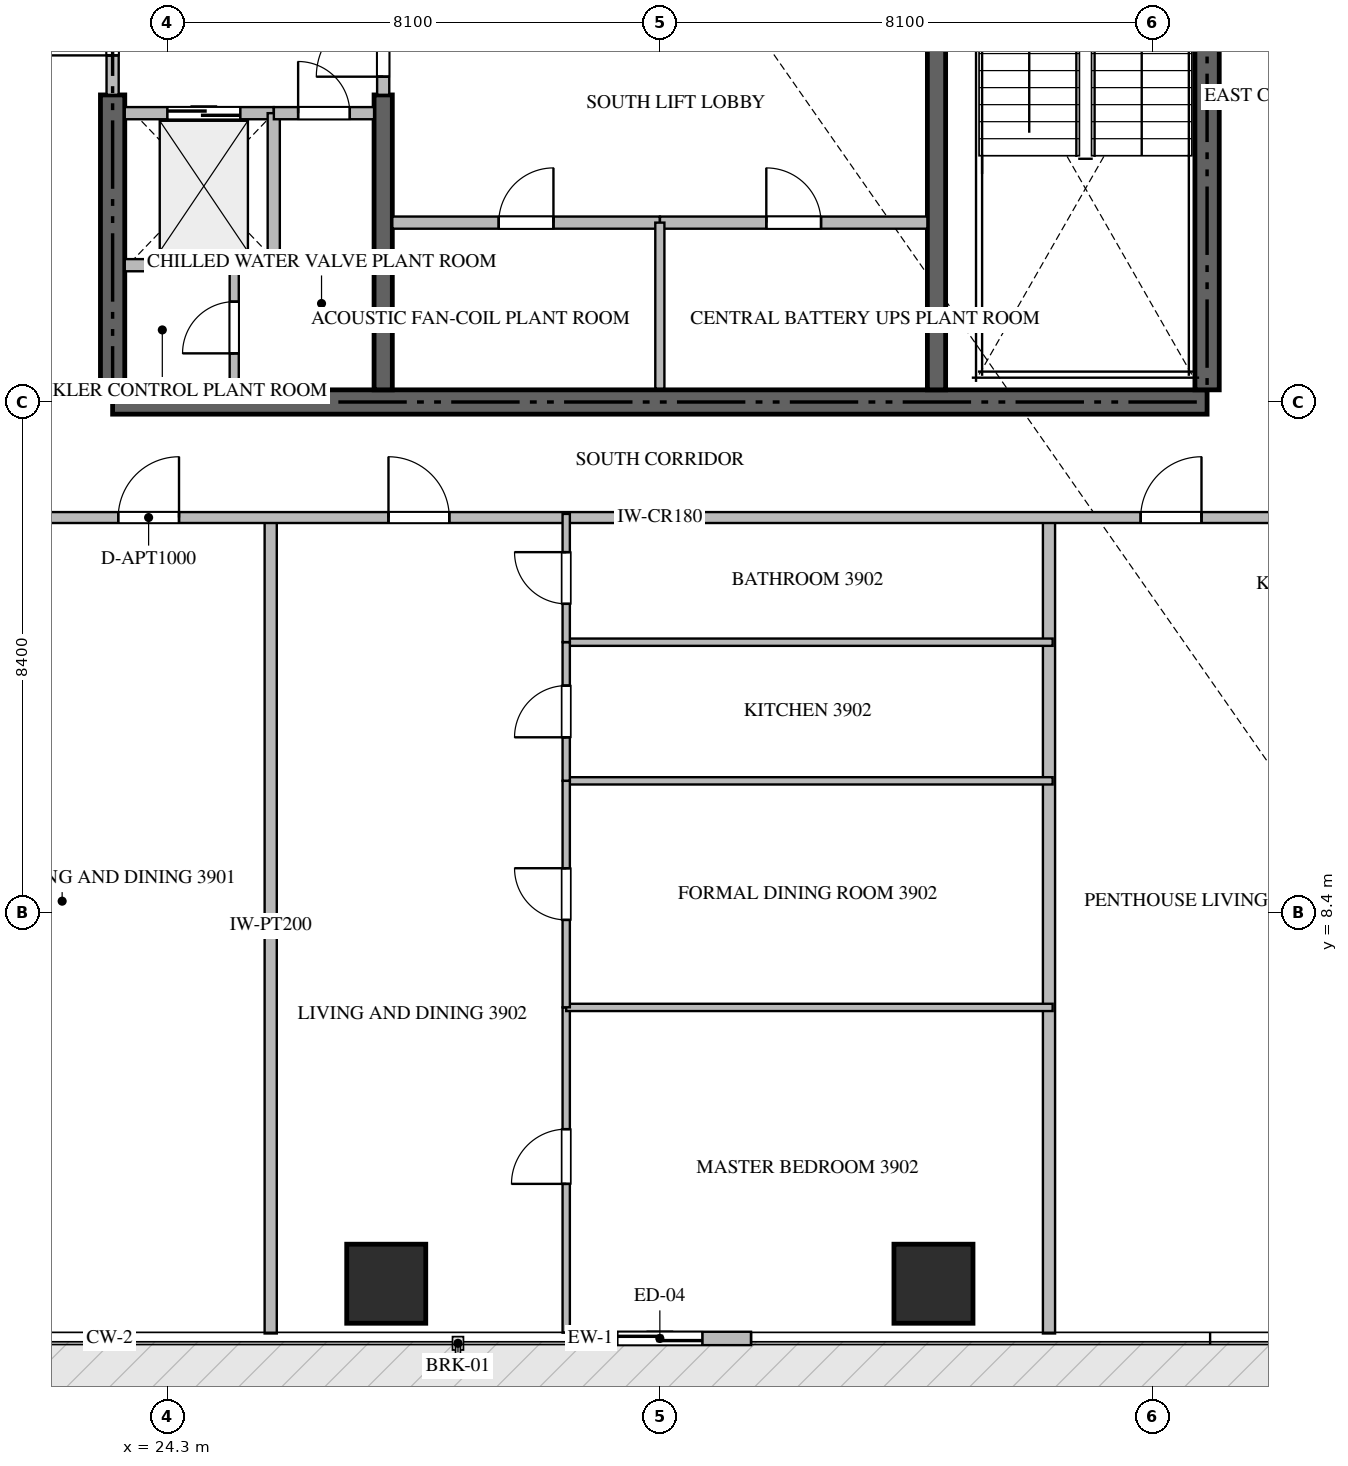
"""IFC4 building model, lengths in metres.
Left out: names, types, materials, properties, quantities, classifications, styles, units other than length and angle.
Written with IfcOpenShell. Run it as: python <this file> out.ifc"""

import sys

from ifc_helpers import new_model, si_unit, direction, frame, frame_2d, origin, origin_2d, place, context, subcontext, project, spatial, rectangle, extrude, source, transform, mapped, element, fill, save


model = new_model("IFC4")
c1 = context("Model", 3, precision=1e-05, world=origin(), true_north=direction((0.0, 1.0)))
c2 = subcontext(c1, "Body", "Model", "MODEL_VIEW")
j1 = project(units=[si_unit("LENGTHUNIT", "METRE"), si_unit("PLANEANGLEUNIT", "RADIAN")], contexts=[c1])
p1 = place(None, origin())
s1 = spatial("IfcSite", under=j1, at=p1, CompositionType="ELEMENT")
p2 = place(p1, origin())
s2 = spatial("IfcBuilding", under=s1, at=p2, CompositionType="ELEMENT")
p3 = place(p2, frame((0.0, 0.0, 157.65)))
s3 = spatial("IfcBuildingStorey", under=s2, at=p3, CompositionType="ELEMENT", Elevation=157.65)
p4 = place(p3, frame((23.4, 16.8, -0.26), z_axis=(0.0, 0.0, 1.0), x_axis=(1.0, 0.0, 0.0)))
e1 = element("IfcWall", 1, at=p4, inside=s3, PredefinedType="SHEAR", context=c2, shape_type="SweptSolid", body=[
    extrude(rectangle(XDim=18.0, YDim=0.4, at=frame_2d((9.0, 0.0))), origin(), (0.0, 0.0, 1.0), 3.748),
])
p5 = place(p3, frame((23.4, 17.0, -0.26), z_axis=(0.0, 0.0, 1.0), x_axis=(0.0, 1.0, 0.0)))
e2 = element("IfcWall", 2, at=p5, inside=s3, PredefinedType="SHEAR", context=c2, shape_type="SweptSolid", body=[
    extrude(rectangle(XDim=4.85, YDim=0.4, at=frame_2d((2.425, 0.0))), origin(), (0.0, 0.0, 1.0), 3.748),
])
p6 = place(p3, frame((41.4, 17.0, -0.26), z_axis=(0.0, 0.0, 1.0), x_axis=(0.0, 1.0, 0.0)))
e3 = element("IfcWall", 3, at=p6, inside=s3, PredefinedType="SHEAR", context=c2, shape_type="SweptSolid", body=[
    extrude(rectangle(XDim=8.35, YDim=0.4, at=frame_2d((4.175, 0.0))), origin(), (0.0, 0.0, 1.0), 3.748),
])
p7 = place(p3, frame((27.85, 17.0, -0.26), z_axis=(0.0, 0.0, 1.0), x_axis=(0.0, 1.0, 0.0)))
e4 = element("IfcWall", 4, at=p7, inside=s3, PredefinedType="SHEAR", context=c2, shape_type="SweptSolid", body=[
    extrude(rectangle(XDim=4.85, YDim=0.3, at=frame_2d((2.425, 0.0))), origin(), (0.0, 0.0, 1.0), 3.748),
])
p8 = place(p3, frame((36.95, 17.0, -0.26), z_axis=(0.0, 0.0, 1.0), x_axis=(0.0, 1.0, 0.0)))
e5 = element("IfcWall", 5, at=p8, inside=s3, PredefinedType="SHEAR", context=c2, shape_type="SweptSolid", body=[
    extrude(rectangle(XDim=8.35, YDim=0.3, at=frame_2d((4.175, 0.0))), origin(), (0.0, 0.0, 1.0), 3.748),
])
m1 = source(origin(), c2, "Body", "SweptSolid", [
    extrude(rectangle(XDim=1.3, YDim=1.3, at=origin_2d()), origin(), (0.0, 0.0, 1.0), 3.75),
])
for number, where, z_axis, x_axis in (
    (6, (27.9, 2.3, -0.26), (0.0, 0.0, 1.0), (1.0, 0.0, 0.0)),
    (7, (36.9, 2.3, -0.26), (0.0, 0.0, 1.0), (1.0, 0.0, 0.0)),
):
    element("IfcColumn", number, at=place(p3, frame(where, z_axis=z_axis, x_axis=x_axis)), inside=s3, PredefinedType="COLUMN", context=c2, shape_type="MappedRepresentation", body=[
        mapped(m1, transform((0.0, 0.0, 0.0), scale=1.0)),
    ])
p9 = place(p3, frame((30.9, 1.4, 0.0), z_axis=(0.0, 0.0, 1.0), x_axis=(1.0, 0.0, 0.0)))
e8 = element("IfcWall", 8, at=p9, inside=s3, PredefinedType="ELEMENTEDWALL", context=c2, shape_type="SweptSolid", body=[
    extrude(rectangle(XDim=3.0, YDim=0.22, at=frame_2d((1.5, 0.0))), origin(), (0.0, 0.0, 1.0), 3.475),
])
p10 = place(p9, frame((0.8, 0.0, 0.0)))
e9 = element("IfcOpeningElement", 9, at=p10, cuts=e8, PredefinedType="OPENING", context=c2, shape_type="SweptSolid", body=[
    extrude(rectangle(XDim=1.4, YDim=2.25, at=frame_2d((0.7, 1.125))), frame((0.0, 0.12, 0.0), z_axis=(0.0, -1.0, 0.0), x_axis=(1.0, 0.0, 0.0)), (0.0, 0.0, 1.0), 0.24),
])
p11 = place(p3, frame((23.6, 21.55, 0.0), z_axis=(0.0, 0.0, 1.0), x_axis=(1.0, 0.0, 0.0)))
e10 = element("IfcWall", 10, at=p11, inside=s3, PredefinedType="STANDARD", context=c2, shape_type="SweptSolid", body=[
    extrude(rectangle(XDim=2.45, YDim=0.2, at=frame_2d((1.225, 0.0))), origin(), (0.0, 0.0, 1.0), 3.49),
])
p12 = place(p11, frame((0.7, 0.0, 0.0)))
e11 = element("IfcOpeningElement", 11, at=p12, cuts=e10, PredefinedType="OPENING", context=c2, shape_type="SweptSolid", body=[
    extrude(rectangle(XDim=1.2, YDim=2.2, at=frame_2d((0.6, 1.1))), frame((0.0, 0.11, 0.0), z_axis=(0.0, -1.0, 0.0), x_axis=(1.0, 0.0, 0.0)), (0.0, 0.0, 1.0), 0.22),
])
p13 = place(p3, frame((26.05, 19.05, 0.0), z_axis=(0.0, 0.0, 1.0), x_axis=(0.0, 1.0, 0.0)))
e12 = element("IfcWall", 12, at=p13, inside=s3, PredefinedType="STANDARD", context=c2, shape_type="SweptSolid", body=[
    extrude(rectangle(XDim=2.5, YDim=0.2, at=frame_2d((1.25, 0.0))), origin(), (0.0, 0.0, 1.0), 3.49),
])
p14 = place(p3, frame((23.6, 19.05, 0.0), z_axis=(0.0, 0.0, 1.0), x_axis=(1.0, 0.0, 0.0)))
e13 = element("IfcWall", 13, at=p14, inside=s3, PredefinedType="STANDARD", context=c2, shape_type="SweptSolid", body=[
    extrude(rectangle(XDim=2.45, YDim=0.2, at=frame_2d((1.225, 0.0))), origin(), (0.0, 0.0, 1.0), 3.49),
])
p15 = place(p3, frame((26.052, 21.55, 0.0), z_axis=(0.0, 0.0, 1.0), x_axis=(1.0, 0.0, 0.0)))
e14 = element("IfcWall", 14, at=p15, inside=s3, PredefinedType="STANDARD", context=c2, shape_type="SweptSolid", body=[
    extrude(rectangle(XDim=1.648, YDim=0.2, at=frame_2d((0.824, 0.0))), origin(), (0.0, 0.0, 1.0), 3.49),
])
p16 = place(p15, frame((0.399, 0.0, 0.0)))
e15 = element("IfcOpeningElement", 15, at=p16, cuts=e14, PredefinedType="OPENING", context=c2, shape_type="SweptSolid", body=[
    extrude(rectangle(XDim=0.85, YDim=2.1, at=frame_2d((0.425, 1.05))), frame((0.0, 0.11, 0.0), z_axis=(0.0, -1.0, 0.0), x_axis=(1.0, 0.0, 0.0)), (0.0, 0.0, 1.0), 0.22),
])
p17 = place(p3, frame((23.4, 21.852, 0.0), z_axis=(0.0, 0.0, 1.0), x_axis=(0.0, 1.0, 0.0)))
e16 = element("IfcWall", 16, at=p17, inside=s3, PredefinedType="STANDARD", context=c2, shape_type="SweptSolid", body=[
    extrude(rectangle(XDim=2.396, YDim=0.2, at=frame_2d((1.198, 0.0))), origin(), (0.0, 0.0, 1.0), 3.49),
])
p18 = place(p17, frame((0.648, 0.0, 0.0)))
e17 = element("IfcOpeningElement", 17, at=p18, cuts=e16, PredefinedType="OPENING", context=c2, shape_type="SweptSolid", body=[
    extrude(rectangle(XDim=1.1, YDim=2.15, at=frame_2d((0.55, 1.075))), frame((0.0, 0.11, 0.0), z_axis=(0.0, -1.0, 0.0), x_axis=(1.0, 0.0, 0.0)), (0.0, 0.0, 1.0), 0.22),
])
p19 = place(p3, frame((27.85, 21.852, 0.0), z_axis=(0.0, 0.0, 1.0), x_axis=(0.0, 1.0, 0.0)))
e18 = element("IfcWall", 18, at=p19, inside=s3, PredefinedType="STANDARD", context=c2, shape_type="SweptSolid", body=[
    extrude(rectangle(XDim=1.696, YDim=0.2, at=frame_2d((0.848, 0.0))), origin(), (0.0, 0.0, 1.0), 3.49),
])
p20 = place(p19, frame((0.298, 0.0, 0.0)))
e19 = element("IfcOpeningElement", 19, at=p20, cuts=e18, PredefinedType="OPENING", context=c2, shape_type="SweptSolid", body=[
    extrude(rectangle(XDim=1.1, YDim=2.15, at=frame_2d((0.55, 1.075))), frame((0.0, 0.11, 0.0), z_axis=(0.0, -1.0, 0.0), x_axis=(1.0, 0.0, 0.0)), (0.0, 0.0, 1.0), 0.22),
])
p21 = place(p3, frame((25.4, 17.0, 0.0), z_axis=(0.0, 0.0, 1.0), x_axis=(0.0, 1.0, 0.0)))
e20 = element("IfcWall", 20, at=p21, inside=s3, PredefinedType="PARTITIONING", context=c2, shape_type="SweptSolid", body=[
    extrude(rectangle(XDim=2.05, YDim=0.15, at=frame_2d((1.025, 0.0))), origin(), (0.0, 0.0, 1.0), 3.49),
])
p22 = place(p21, frame((0.6, 0.0, 0.0)))
e21 = element("IfcOpeningElement", 21, at=p22, cuts=e20, PredefinedType="OPENING", context=c2, shape_type="SweptSolid", body=[
    extrude(rectangle(XDim=0.85, YDim=2.1, at=frame_2d((0.425, 1.05))), frame((0.0, 0.085, 0.0), z_axis=(0.0, -1.0, 0.0), x_axis=(1.0, 0.0, 0.0)), (0.0, 0.0, 1.0), 0.17),
])
p23 = place(p3, frame((28.0, 19.75, 0.0), z_axis=(0.0, 0.0, 1.0), x_axis=(1.0, 0.0, 0.0)))
e22 = element("IfcWall", 22, at=p23, inside=s3, PredefinedType="STANDARD", context=c2, shape_type="SweptSolid", body=[
    extrude(rectangle(XDim=4.4, YDim=0.2, at=frame_2d((2.2, 0.0))), origin(), (0.0, 0.0, 1.0), 3.49),
])
p24 = place(p23, frame((1.75, 0.0, 0.0)))
e23 = element("IfcOpeningElement", 23, at=p24, cuts=e22, PredefinedType="OPENING", context=c2, shape_type="SweptSolid", body=[
    extrude(rectangle(XDim=0.9, YDim=2.1, at=frame_2d((0.45, 1.05))), frame((0.0, 0.11, 0.0), z_axis=(0.0, -1.0, 0.0), x_axis=(1.0, 0.0, 0.0)), (0.0, 0.0, 1.0), 0.22),
])
p25 = place(p3, frame((32.402, 19.75, 0.0), z_axis=(0.0, 0.0, 1.0), x_axis=(1.0, 0.0, 0.0)))
e24 = element("IfcWall", 24, at=p25, inside=s3, PredefinedType="STANDARD", context=c2, shape_type="SweptSolid", body=[
    extrude(rectangle(XDim=4.398, YDim=0.2, at=frame_2d((2.199, 0.0))), origin(), (0.0, 0.0, 1.0), 3.49),
])
p26 = place(p25, frame((1.749, 0.0, 0.0)))
e25 = element("IfcOpeningElement", 25, at=p26, cuts=e24, PredefinedType="OPENING", context=c2, shape_type="SweptSolid", body=[
    extrude(rectangle(XDim=0.9, YDim=2.1, at=frame_2d((0.45, 1.05))), frame((0.0, 0.11, 0.0), z_axis=(0.0, -1.0, 0.0), x_axis=(1.0, 0.0, 0.0)), (0.0, 0.0, 1.0), 0.22),
])
p27 = place(p3, frame((32.4, 17.02, 0.0), z_axis=(0.0, 0.0, 1.0), x_axis=(0.0, 1.0, 0.0)))
e26 = element("IfcWall", 26, at=p27, inside=s3, PredefinedType="PARTITIONING", context=c2, shape_type="SweptSolid", body=[
    extrude(rectangle(XDim=2.73, YDim=0.15, at=frame_2d((1.365, 0.0))), origin(), (0.0, 0.0, 1.0), 3.49),
])
for number, where, z_axis, x_axis in (
    (27, (26.0, 1.482, 0.0), (0.0, 0.0, 1.0), (0.0, 1.0, 0.0)),
    (28, (38.8, 1.482, 0.0), (0.0, 0.0, 1.0), (0.0, 1.0, 0.0)),
):
    element("IfcWall", number, at=place(p3, frame(where, z_axis=z_axis, x_axis=x_axis)), inside=s3, PredefinedType="PARTITIONING", context=c2, shape_type="SweptSolid", body=[
        extrude(rectangle(XDim=13.418, YDim=0.2, at=frame_2d((6.709, 0.0))), origin(), (0.0, 0.0, 1.0), 3.49),
    ])
p28 = place(p3, frame((20.952, 14.9, 0.0), z_axis=(0.0, 0.0, 1.0), x_axis=(1.0, 0.0, 0.0)))
e29 = element("IfcWall", 29, at=p28, inside=s3, PredefinedType="PARTITIONING", context=c2, shape_type="SweptSolid", body=[
    extrude(rectangle(XDim=22.896, YDim=0.18, at=frame_2d((11.448, 0.0))), origin(), (0.0, 0.0, 1.0), 3.49),
])
p29 = place(p28, frame((2.54, 0.0, 0.0)))
e30 = element("IfcOpeningElement", 30, at=p29, cuts=e29, PredefinedType="OPENING", context=c2, shape_type="SweptSolid", body=[
    extrude(rectangle(XDim=1.0, YDim=2.15, at=frame_2d((0.5, 1.075))), frame((0.0, 0.1, 0.0), z_axis=(0.0, -1.0, 0.0), x_axis=(1.0, 0.0, 0.0)), (0.0, 0.0, 1.0), 0.2),
])
p30 = place(p28, frame((6.985, 0.0, 0.0)))
e31 = element("IfcOpeningElement", 31, at=p30, cuts=e29, PredefinedType="OPENING", context=c2, shape_type="SweptSolid", body=[
    extrude(rectangle(XDim=1.0, YDim=2.15, at=frame_2d((0.5, 1.075))), frame((0.0, 0.1, 0.0), z_axis=(0.0, -1.0, 0.0), x_axis=(1.0, 0.0, 0.0)), (0.0, 0.0, 1.0), 0.2),
])
p31 = place(p28, frame((19.356, 0.0, 0.0)))
e32 = element("IfcOpeningElement", 32, at=p31, cuts=e29, PredefinedType="OPENING", context=c2, shape_type="SweptSolid", body=[
    extrude(rectangle(XDim=1.0, YDim=2.15, at=frame_2d((0.5, 1.075))), frame((0.0, 0.1, 0.0), z_axis=(0.0, -1.0, 0.0), x_axis=(1.0, 0.0, 0.0)), (0.0, 0.0, 1.0), 0.2),
])
p32 = place(p3, frame((30.86, 1.495, 0.0), z_axis=(0.0, 0.0, 1.0), x_axis=(0.0, 1.0, 0.0)))
e33 = element("IfcWall", 33, at=p32, inside=s3, PredefinedType="PARTITIONING", context=c2, shape_type="SweptSolid", body=[
    extrude(rectangle(XDim=5.349, YDim=0.12, at=frame_2d((2.674, 0.0))), origin(), (0.0, 0.0, 1.0), 3.49),
])
p33 = place(p32, frame((2.447, 0.0, 0.0)))
e34 = element("IfcOpeningElement", 34, at=p33, cuts=e33, PredefinedType="OPENING", context=c2, shape_type="SweptSolid", body=[
    extrude(rectangle(XDim=0.9, YDim=2.1, at=frame_2d((0.45, 1.05))), frame((0.0, 0.07, 0.0), z_axis=(0.0, -1.0, 0.0), x_axis=(1.0, 0.0, 0.0)), (0.0, 0.0, 1.0), 0.14),
])
for number, where, z_axis, x_axis in (
    (35, (30.86, 6.844, 0.0), (0.0, 0.0, 1.0), (1.0, 0.0, 0.0)),
    (36, (30.86, 10.57, 0.0), (0.0, 0.0, 1.0), (1.0, 0.0, 0.0)),
    (37, (30.86, 12.85, 0.0), (0.0, 0.0, 1.0), (1.0, 0.0, 0.0)),
):
    element("IfcWall", number, at=place(p3, frame(where, z_axis=z_axis, x_axis=x_axis)), inside=s3, PredefinedType="PARTITIONING", context=c2, shape_type="SweptSolid", body=[
        extrude(rectangle(XDim=8.0, YDim=0.12, at=frame_2d((4.0, 0.0))), origin(), (0.0, 0.0, 1.0), 3.49),
    ])
p34 = place(p3, frame((30.86, 6.846, 0.0), z_axis=(0.0, 0.0, 1.0), x_axis=(0.0, 1.0, 0.0)))
e38 = element("IfcWall", 38, at=p34, inside=s3, PredefinedType="PARTITIONING", context=c2, shape_type="SweptSolid", body=[
    extrude(rectangle(XDim=3.724, YDim=0.12, at=frame_2d((1.862, 0.0))), origin(), (0.0, 0.0, 1.0), 3.49),
])
p35 = place(p34, frame((1.437, 0.0, 0.0)))
e39 = element("IfcOpeningElement", 39, at=p35, cuts=e38, PredefinedType="OPENING", context=c2, shape_type="SweptSolid", body=[
    extrude(rectangle(XDim=0.85, YDim=2.1, at=frame_2d((0.425, 1.05))), frame((0.0, 0.07, 0.0), z_axis=(0.0, -1.0, 0.0), x_axis=(1.0, 0.0, 0.0)), (0.0, 0.0, 1.0), 0.14),
])
p36 = place(p3, frame((30.86, 10.572, 0.0), z_axis=(0.0, 0.0, 1.0), x_axis=(0.0, 1.0, 0.0)))
e40 = element("IfcWall", 40, at=p36, inside=s3, PredefinedType="PARTITIONING", context=c2, shape_type="SweptSolid", body=[
    extrude(rectangle(XDim=2.278, YDim=0.12, at=frame_2d((1.139, 0.0))), origin(), (0.0, 0.0, 1.0), 3.49),
])
p37 = place(p36, frame((0.714, 0.0, 0.0)))
e41 = element("IfcOpeningElement", 41, at=p37, cuts=e40, PredefinedType="OPENING", context=c2, shape_type="SweptSolid", body=[
    extrude(rectangle(XDim=0.85, YDim=2.1, at=frame_2d((0.425, 1.05))), frame((0.0, 0.07, 0.0), z_axis=(0.0, -1.0, 0.0), x_axis=(1.0, 0.0, 0.0)), (0.0, 0.0, 1.0), 0.14),
])
p38 = place(p3, frame((30.86, 12.852, 0.0), z_axis=(0.0, 0.0, 1.0), x_axis=(0.0, 1.0, 0.0)))
e42 = element("IfcWall", 42, at=p38, inside=s3, PredefinedType="PARTITIONING", context=c2, shape_type="SweptSolid", body=[
    extrude(rectangle(XDim=2.108, YDim=0.12, at=frame_2d((1.054, 0.0))), origin(), (0.0, 0.0, 1.0), 3.49),
])
p39 = place(p38, frame((0.629, 0.0, 0.0)))
e43 = element("IfcOpeningElement", 43, at=p39, cuts=e42, PredefinedType="OPENING", context=c2, shape_type="SweptSolid", body=[
    extrude(rectangle(XDim=0.85, YDim=2.1, at=frame_2d((0.425, 1.05))), frame((0.0, 0.07, 0.0), z_axis=(0.0, -1.0, 0.0), x_axis=(1.0, 0.0, 0.0)), (0.0, 0.0, 1.0), 0.14),
])
m2 = source(origin(), c2, "Body", "SweptSolid", [
    extrude(rectangle(XDim=1.4, YDim=2.25, at=frame_2d((0.7, 1.125))), frame((0.0, 0.025, 0.0), z_axis=(0.0, -1.0, 0.0), x_axis=(1.0, 0.0, 0.0)), (0.0, 0.0, 1.0), 0.05),
])
p40 = place(p10, origin())
e44 = element("IfcDoor", 44, at=p40, inside=s3, OperationType="SLIDING_TO_LEFT", PredefinedType="DOOR", context=c2, shape_type="MappedRepresentation", body=[
    mapped(m2, transform((0.0, 0.0, 0.0), scale=1.0)),
])
fill(e9, e44)
m3 = source(origin(), c2, "Body", "SweptSolid", [
    extrude(rectangle(XDim=1.2, YDim=2.2, at=frame_2d((0.6, 1.1))), frame((0.0, 0.025, 0.0), z_axis=(0.0, -1.0, 0.0), x_axis=(1.0, 0.0, 0.0)), (0.0, 0.0, 1.0), 0.05),
])
p41 = place(p12, origin())
e45 = element("IfcDoor", 45, at=p41, inside=s3, OperationType="DOUBLE_DOOR_SLIDING", PredefinedType="DOOR", context=c2, shape_type="MappedRepresentation", body=[
    mapped(m3, transform((0.0, 0.0, 0.0), scale=1.0)),
])
fill(e11, e45)
m4 = source(origin(), c2, "Body", "SweptSolid", [
    extrude(rectangle(XDim=0.85, YDim=2.1, at=frame_2d((0.425, 1.05))), frame((0.0, 0.025, 0.0), z_axis=(0.0, -1.0, 0.0), x_axis=(1.0, 0.0, 0.0)), (0.0, 0.0, 1.0), 0.05),
])
p42 = place(p16, origin())
e46 = element("IfcDoor", 46, at=p42, inside=s3, OperationType="SINGLE_SWING_LEFT", PredefinedType="DOOR", context=c2, shape_type="MappedRepresentation", body=[
    mapped(m4, transform((0.0, 0.0, 0.0), scale=1.0)),
])
fill(e15, e46)
m5 = source(origin(), c2, "Body", "SweptSolid", [
    extrude(rectangle(XDim=1.1, YDim=2.15, at=frame_2d((0.55, 1.075))), frame((0.0, 0.025, 0.0), z_axis=(0.0, -1.0, 0.0), x_axis=(1.0, 0.0, 0.0)), (0.0, 0.0, 1.0), 0.05),
])
p43 = place(p18, origin())
e47 = element("IfcDoor", 47, at=p43, inside=s3, OperationType="SINGLE_SWING_LEFT", PredefinedType="DOOR", context=c2, shape_type="MappedRepresentation", body=[
    mapped(m5, transform((0.0, 0.0, 0.0), scale=1.0)),
])
fill(e17, e47)
p44 = place(p20, origin())
e48 = element("IfcDoor", 48, at=p44, inside=s3, OperationType="SINGLE_SWING_LEFT", PredefinedType="DOOR", context=c2, shape_type="MappedRepresentation", body=[
    mapped(m5, transform((0.0, 0.0, 0.0), scale=1.0)),
])
fill(e19, e48)
p45 = place(p22, origin())
e49 = element("IfcDoor", 49, at=p45, inside=s3, OperationType="SINGLE_SWING_LEFT", PredefinedType="DOOR", context=c2, shape_type="MappedRepresentation", body=[
    mapped(m4, transform((0.0, 0.0, 0.0), scale=1.0)),
])
fill(e21, e49)
m6 = source(origin(), c2, "Body", "SweptSolid", [
    extrude(rectangle(XDim=0.9, YDim=2.1, at=frame_2d((0.45, 1.05))), frame((0.0, 0.025, 0.0), z_axis=(0.0, -1.0, 0.0), x_axis=(1.0, 0.0, 0.0)), (0.0, 0.0, 1.0), 0.05),
])
p46 = place(p24, origin())
e50 = element("IfcDoor", 50, at=p46, inside=s3, OperationType="SINGLE_SWING_RIGHT", PredefinedType="DOOR", context=c2, shape_type="MappedRepresentation", body=[
    mapped(m6, transform((0.0, 0.0, 0.0), scale=1.0)),
])
fill(e23, e50)
p47 = place(p26, origin())
e51 = element("IfcDoor", 51, at=p47, inside=s3, OperationType="SINGLE_SWING_LEFT", PredefinedType="DOOR", context=c2, shape_type="MappedRepresentation", body=[
    mapped(m6, transform((0.0, 0.0, 0.0), scale=1.0)),
])
fill(e25, e51)
m7 = source(origin(), c2, "Body", "SweptSolid", [
    extrude(rectangle(XDim=1.0, YDim=2.15, at=frame_2d((0.5, 1.075))), frame((0.0, 0.025, 0.0), z_axis=(0.0, -1.0, 0.0), x_axis=(1.0, 0.0, 0.0)), (0.0, 0.0, 1.0), 0.05),
])
p48 = place(p29, origin())
e52 = element("IfcDoor", 52, at=p48, inside=s3, OperationType="SINGLE_SWING_RIGHT", PredefinedType="DOOR", context=c2, shape_type="MappedRepresentation", body=[
    mapped(m7, transform((0.0, 0.0, 0.0), scale=1.0)),
])
fill(e30, e52)
p49 = place(p30, origin())
e53 = element("IfcDoor", 53, at=p49, inside=s3, OperationType="SINGLE_SWING_LEFT", PredefinedType="DOOR", context=c2, shape_type="MappedRepresentation", body=[
    mapped(m7, transform((0.0, 0.0, 0.0), scale=1.0)),
])
fill(e31, e53)
p50 = place(p31, origin())
e54 = element("IfcDoor", 54, at=p50, inside=s3, OperationType="SINGLE_SWING_RIGHT", PredefinedType="DOOR", context=c2, shape_type="MappedRepresentation", body=[
    mapped(m7, transform((0.0, 0.0, 0.0), scale=1.0)),
])
fill(e32, e54)
p51 = place(p33, origin())
e55 = element("IfcDoor", 55, at=p51, inside=s3, OperationType="SINGLE_SWING_LEFT", PredefinedType="DOOR", context=c2, shape_type="MappedRepresentation", body=[
    mapped(m6, transform((0.0, 0.0, 0.0), scale=1.0)),
])
fill(e34, e55)
p52 = place(p35, origin())
e56 = element("IfcDoor", 56, at=p52, inside=s3, OperationType="SINGLE_SWING_RIGHT", PredefinedType="DOOR", context=c2, shape_type="MappedRepresentation", body=[
    mapped(m4, transform((0.0, 0.0, 0.0), scale=1.0)),
])
fill(e39, e56)
p53 = place(p37, origin())
e57 = element("IfcDoor", 57, at=p53, inside=s3, OperationType="SINGLE_SWING_LEFT", PredefinedType="DOOR", context=c2, shape_type="MappedRepresentation", body=[
    mapped(m4, transform((0.0, 0.0, 0.0), scale=1.0)),
])
fill(e41, e57)
p54 = place(p39, origin())
e58 = element("IfcDoor", 58, at=p54, inside=s3, OperationType="SINGLE_SWING_RIGHT", PredefinedType="DOOR", context=c2, shape_type="MappedRepresentation", body=[
    mapped(m4, transform((0.0, 0.0, 0.0), scale=1.0)),
])
fill(e43, e58)
save(model, sys.argv[1])
